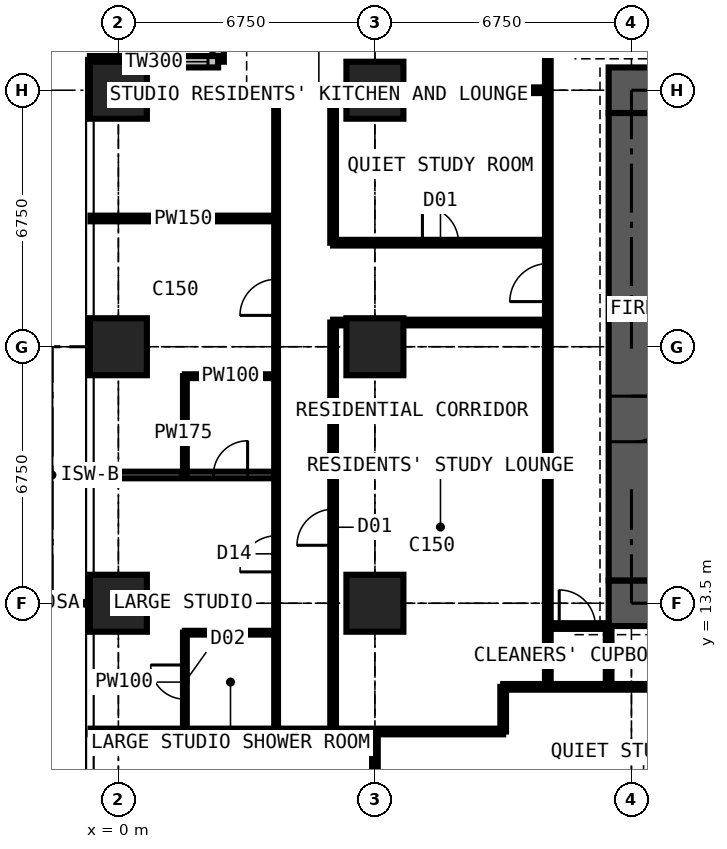
"""IFC4 building model, lengths in metres.
Left out: names, types, materials, properties, quantities, classifications, styles, units other than length and angle.
Written with IfcOpenShell. Run it as: python <this file> out.ifc"""

import sys

from ifc_helpers import new_model, si_unit, direction, frame, frame_2d, origin, origin_2d, place, context, subcontext, project, spatial, rectangle, extrude, element, fill, save


model = new_model("IFC4")
c1 = context("Model", 3, precision=1e-05, world=origin(), true_north=direction((0.0, 1.0)))
c2 = subcontext(c1, "Body", "Model", "MODEL_VIEW")
j1 = project(units=[si_unit("LENGTHUNIT", "METRE"), si_unit("PLANEANGLEUNIT", "RADIAN")], contexts=[c1])
p1 = place(None, origin())
s1 = spatial("IfcSite", under=j1, at=p1, CompositionType="ELEMENT")
p2 = place(p1, origin())
s2 = spatial("IfcBuilding", under=s1, at=p2, CompositionType="ELEMENT")
p3 = place(p2, frame((0.0, 0.0, 112.5)))
s3 = spatial("IfcBuildingStorey", under=s2, at=p3, CompositionType="ELEMENT", Elevation=112.5)
for number, where, z_axis, x_axis in (
    (1, (0.0, 13.5, 0.0), (0.0, 0.0, 1.0), (1.0, 0.0, 0.0)),
    (2, (0.0, 20.25, 0.0), (0.0, 0.0, 1.0), (1.0, 0.0, 0.0)),
    (3, (0.0, 27.0, 0.0), (0.0, 0.0, 1.0), (1.0, 0.0, 0.0)),
    (4, (6.75, 13.5, 0.0), (0.0, 0.0, 1.0), (1.0, 0.0, 0.0)),
    (5, (6.75, 20.25, 0.0), (0.0, 0.0, 1.0), (1.0, 0.0, 0.0)),
    (6, (6.75, 27.0, 0.0), (0.0, 0.0, 1.0), (1.0, 0.0, 0.0)),
):
    element("IfcColumn", number, at=place(p3, frame(where, z_axis=z_axis, x_axis=x_axis)), inside=s3, PredefinedType="COLUMN", context=c2, shape_type="SweptSolid", body=[
        extrude(rectangle(XDim=1.5, YDim=1.5, at=origin_2d()), origin(), (0.0, 0.0, 1.0), 3.6),
    ])
p4 = place(p3, frame((12.9, 13.5, 0.0), z_axis=(0.0, 0.0, 1.0), x_axis=(1.0, 0.0, 0.0)))
e7 = element("IfcWall", 7, at=p4, inside=s3, PredefinedType="SHEAR", context=c2, shape_type="SweptSolid", body=[
    extrude(rectangle(XDim=14.7, YDim=1.2, at=frame_2d((7.35, 0.0))), origin(), (0.0, 0.0, 1.0), 3.6),
])
p5 = place(p3, frame((27.6, 27.0, 0.0), z_axis=(0.0, 0.0, 1.0), x_axis=(-1.0, 0.0, 0.0)))
e8 = element("IfcWall", 8, at=p5, inside=s3, PredefinedType="SHEAR", context=c2, shape_type="SweptSolid", body=[
    extrude(rectangle(XDim=14.7, YDim=1.2, at=frame_2d((7.35, 0.0))), origin(), (0.0, 0.0, 1.0), 3.6),
])
p6 = place(p5, frame((5.225, 0.0, 0.0)))
e9 = element("IfcOpeningElement", 9, at=p6, cuts=e8, PredefinedType="OPENING", context=c2, shape_type="SweptSolid", body=[
    extrude(rectangle(XDim=0.9, YDim=2.2, at=frame_2d((0.45, 1.1))), frame((0.0, 0.61, 0.0), z_axis=(0.0, -1.0, 0.0), x_axis=(1.0, 0.0, 0.0)), (0.0, 0.0, 1.0), 1.22),
])
p7 = place(p5, frame((8.2, 0.0, 0.0)))
e10 = element("IfcOpeningElement", 10, at=p7, cuts=e8, PredefinedType="OPENING", context=c2, shape_type="SweptSolid", body=[
    extrude(rectangle(XDim=1.0, YDim=2.2, at=frame_2d((0.5, 1.1))), frame((0.0, 0.61, 0.0), z_axis=(0.0, -1.0, 0.0), x_axis=(1.0, 0.0, 0.0)), (0.0, 0.0, 1.0), 1.22),
])
p8 = place(p3, frame((13.5, 26.4, 0.0), z_axis=(0.0, 0.0, 1.0), x_axis=(0.0, -1.0, 0.0)))
e11 = element("IfcWall", 11, at=p8, inside=s3, PredefinedType="SHEAR", context=c2, shape_type="SweptSolid", body=[
    extrude(rectangle(XDim=12.3, YDim=1.2, at=frame_2d((6.15, 0.0))), origin(), (0.0, 0.0, 1.0), 3.6),
])
p9 = place(p8, frame((7.45, 0.0, 0.0)))
e12 = element("IfcOpeningElement", 12, at=p9, cuts=e11, PredefinedType="OPENING", context=c2, shape_type="SweptSolid", body=[
    extrude(rectangle(XDim=1.2, YDim=2.2, at=frame_2d((0.6, 1.1))), frame((0.0, 0.61, 0.0), z_axis=(0.0, -1.0, 0.0), x_axis=(1.0, 0.0, 0.0)), (0.0, 0.0, 1.0), 1.22),
])
p10 = place(p3, frame((2.625, 31.125, 0.0), z_axis=(0.0, 0.0, 1.0), x_axis=(0.0, -1.0, 0.0)))
e13 = element("IfcWall", 13, at=p10, inside=s3, PredefinedType="SOLIDWALL", context=c2, shape_type="SweptSolid", body=[
    extrude(rectangle(XDim=3.375, YDim=0.3, at=frame_2d((1.688, 0.0))), origin(), (0.0, 0.0, 1.0), 3.375),
])
p11 = place(p10, frame((0.788, 0.0, 0.6)))
e14 = element("IfcOpeningElement", 14, at=p11, cuts=e13, PredefinedType="OPENING", context=c2, shape_type="SweptSolid", body=[
    extrude(rectangle(XDim=1.8, YDim=2.1, at=frame_2d((0.9, 1.05))), frame((0.0, 0.16, 0.0), z_axis=(0.0, -1.0, 0.0), x_axis=(1.0, 0.0, 0.0)), (0.0, 0.0, 1.0), 0.32),
])
p12 = place(p3, frame((2.625, 27.75, 0.0), z_axis=(0.0, 0.0, 1.0), x_axis=(-1.0, 0.0, 0.0)))
e15 = element("IfcWall", 15, at=p12, inside=s3, PredefinedType="SOLIDWALL", context=c2, shape_type="SweptSolid", body=[
    extrude(rectangle(XDim=3.375, YDim=0.3, at=frame_2d((1.688, 0.0))), origin(), (0.0, 0.0, 1.0), 3.375),
])
p13 = place(p12, frame((0.268, 0.0, 0.9)))
e16 = element("IfcOpeningElement", 16, at=p13, cuts=e15, PredefinedType="OPENING", context=c2, shape_type="SweptSolid", body=[
    extrude(rectangle(XDim=1.5, YDim=1.8, at=frame_2d((0.75, 0.9))), frame((0.0, 0.16, 0.0), z_axis=(0.0, -1.0, 0.0), x_axis=(1.0, 0.0, 0.0)), (0.0, 0.0, 1.0), 0.32),
])
p14 = place(p3, frame((-0.734, 10.125, 0.0), z_axis=(0.0, 0.0, 1.0), x_axis=(1.0, 0.0, 0.0)))
e17 = element("IfcWall", 17, at=p14, inside=s3, PredefinedType="PARTITIONING", context=c2, shape_type="SweptSolid", body=[
    extrude(rectangle(XDim=10.859, YDim=0.15, at=frame_2d((5.429, 0.0))), origin(), (0.0, 0.0, 1.0), 3.375),
])
p15 = place(p3, frame((-0.734, 16.875, 0.0), z_axis=(0.0, 0.0, 1.0), x_axis=(1.0, 0.0, 0.0)))
e18 = element("IfcWall", 18, at=p15, inside=s3, PredefinedType="PARTITIONING", context=c2, shape_type="SweptSolid", body=[
    extrude(rectangle(XDim=4.884, YDim=0.175, at=frame_2d((2.442, 0.0))), origin(), (0.0, 0.0, 1.0), 3.375),
])
p16 = place(p15, frame((3.234, 0.0, 0.0)))
e19 = element("IfcOpeningElement", 19, at=p16, cuts=e18, PredefinedType="OPENING", context=c2, shape_type="SweptSolid", body=[
    extrude(rectangle(XDim=0.9, YDim=2.2, at=frame_2d((0.45, 1.1))), frame((0.0, 0.097, 0.0), z_axis=(0.0, -1.0, 0.0), x_axis=(1.0, 0.0, 0.0)), (0.0, 0.0, 1.0), 0.195),
])
p17 = place(p3, frame((-0.734, 23.625, 0.0), z_axis=(0.0, 0.0, 1.0), x_axis=(1.0, 0.0, 0.0)))
e20 = element("IfcWall", 20, at=p17, inside=s3, PredefinedType="PARTITIONING", context=c2, shape_type="SweptSolid", body=[
    extrude(rectangle(XDim=4.884, YDim=0.15, at=frame_2d((2.442, 0.0))), origin(), (0.0, 0.0, 1.0), 3.375),
])
p18 = place(p3, frame((1.75, 10.125, 0.0), z_axis=(0.0, 0.0, 1.0), x_axis=(0.0, 1.0, 0.0)))
e21 = element("IfcWall", 21, at=p18, inside=s3, PredefinedType="PARTITIONING", context=c2, shape_type="SweptSolid", body=[
    extrude(rectangle(XDim=2.6, YDim=0.1, at=frame_2d((1.3, 0.0))), origin(), (0.0, 0.0, 1.0), 3.375),
])
p19 = place(p18, frame((0.85, 0.0, 0.0)))
e22 = element("IfcOpeningElement", 22, at=p19, cuts=e21, PredefinedType="OPENING", context=c2, shape_type="SweptSolid", body=[
    extrude(rectangle(XDim=0.9, YDim=2.2, at=frame_2d((0.45, 1.1))), frame((0.0, 0.06, 0.0), z_axis=(0.0, -1.0, 0.0), x_axis=(1.0, 0.0, 0.0)), (0.0, 0.0, 1.0), 0.12),
])
p20 = place(p3, frame((1.75, 12.725, 0.0), z_axis=(0.0, 0.0, 1.0), x_axis=(1.0, 0.0, 0.0)))
e23 = element("IfcWall", 23, at=p20, inside=s3, PredefinedType="PARTITIONING", context=c2, shape_type="SweptSolid", body=[
    extrude(rectangle(XDim=2.4, YDim=0.1, at=frame_2d((1.2, 0.0))), origin(), (0.0, 0.0, 1.0), 3.375),
])
p21 = place(p3, frame((1.75, 16.875, 0.0), z_axis=(0.0, 0.0, 1.0), x_axis=(0.0, 1.0, 0.0)))
e24 = element("IfcWall", 24, at=p21, inside=s3, PredefinedType="PARTITIONING", context=c2, shape_type="SweptSolid", body=[
    extrude(rectangle(XDim=2.6, YDim=0.1, at=frame_2d((1.3, 0.0))), origin(), (0.0, 0.0, 1.0), 3.375),
])
p22 = place(p3, frame((1.75, 19.475, 0.0), z_axis=(0.0, 0.0, 1.0), x_axis=(1.0, 0.0, 0.0)))
e25 = element("IfcWall", 25, at=p22, inside=s3, PredefinedType="PARTITIONING", context=c2, shape_type="SweptSolid", body=[
    extrude(rectangle(XDim=2.4, YDim=0.1, at=frame_2d((1.2, 0.0))), origin(), (0.0, 0.0, 1.0), 3.375),
])
p23 = place(p3, frame((4.15, 10.125, 0.0), z_axis=(0.0, 0.0, 1.0), x_axis=(0.0, 1.0, 0.0)))
e26 = element("IfcWall", 26, at=p23, inside=s3, PredefinedType="PARTITIONING", context=c2, shape_type="SweptSolid", body=[
    extrude(rectangle(XDim=16.875, YDim=0.1, at=frame_2d((8.438, 0.0))), origin(), (0.0, 0.0, 1.0), 3.375),
])
p24 = place(p23, frame((4.2, 0.0, 0.0)))
e27 = element("IfcOpeningElement", 27, at=p24, cuts=e26, PredefinedType="OPENING", context=c2, shape_type="SweptSolid", body=[
    extrude(rectangle(XDim=0.95, YDim=2.2, at=frame_2d((0.475, 1.1))), frame((0.0, 0.06, 0.0), z_axis=(0.0, -1.0, 0.0), x_axis=(1.0, 0.0, 0.0)), (0.0, 0.0, 1.0), 0.12),
])
p25 = place(p23, frame((10.95, 0.0, 0.0)))
e28 = element("IfcOpeningElement", 28, at=p25, cuts=e26, PredefinedType="OPENING", context=c2, shape_type="SweptSolid", body=[
    extrude(rectangle(XDim=0.95, YDim=2.2, at=frame_2d((0.475, 1.1))), frame((0.0, 0.06, 0.0), z_axis=(0.0, -1.0, 0.0), x_axis=(1.0, 0.0, 0.0)), (0.0, 0.0, 1.0), 0.12),
])
p26 = place(p3, frame((4.15, 27.0, 0.0), z_axis=(0.0, 0.0, 1.0), x_axis=(1.0, 0.0, 0.0)))
e29 = element("IfcWall", 29, at=p26, inside=s3, PredefinedType="PARTITIONING", context=c2, shape_type="SweptSolid", body=[
    extrude(rectangle(XDim=7.15, YDim=0.15, at=frame_2d((3.575, 0.0))), origin(), (0.0, 0.0, 1.0), 2.806),
])
p27 = place(p3, frame((5.65, 10.125, 0.0), z_axis=(0.0, 0.0, 1.0), x_axis=(0.0, 1.0, 0.0)))
e30 = element("IfcWall", 30, at=p27, inside=s3, PredefinedType="PARTITIONING", context=c2, shape_type="SweptSolid", body=[
    extrude(rectangle(XDim=10.762, YDim=0.15, at=frame_2d((5.381, 0.0))), origin(), (0.0, 0.0, 1.0), 3.375),
])
p28 = place(p27, frame((4.9, 0.0, 0.0)))
e31 = element("IfcOpeningElement", 31, at=p28, cuts=e30, PredefinedType="OPENING", context=c2, shape_type="SweptSolid", body=[
    extrude(rectangle(XDim=0.95, YDim=2.2, at=frame_2d((0.475, 1.1))), frame((0.0, 0.085, 0.0), z_axis=(0.0, -1.0, 0.0), x_axis=(1.0, 0.0, 0.0)), (0.0, 0.0, 1.0), 0.17),
])
p29 = place(p3, frame((5.65, 20.887, 0.0), z_axis=(0.0, 0.0, 1.0), x_axis=(1.0, 0.0, 0.0)))
e32 = element("IfcWall", 32, at=p29, inside=s3, PredefinedType="PARTITIONING", context=c2, shape_type="SweptSolid", body=[
    extrude(rectangle(XDim=5.65, YDim=0.15, at=frame_2d((2.825, 0.0))), origin(), (0.0, 0.0, 1.0), 3.375),
])
p30 = place(p3, frame((5.65, 22.988, 0.0), z_axis=(0.0, 0.0, 1.0), x_axis=(0.0, 1.0, 0.0)))
e33 = element("IfcWall", 33, at=p30, inside=s3, PredefinedType="PARTITIONING", context=c2, shape_type="SweptSolid", body=[
    extrude(rectangle(XDim=4.012, YDim=0.15, at=frame_2d((2.006, 0.0))), origin(), (0.0, 0.0, 1.0), 3.375),
])
p31 = place(p3, frame((5.65, 22.988, 0.0), z_axis=(0.0, 0.0, 1.0), x_axis=(1.0, 0.0, 0.0)))
e34 = element("IfcWall", 34, at=p31, inside=s3, PredefinedType="PARTITIONING", context=c2, shape_type="SweptSolid", body=[
    extrude(rectangle(XDim=5.65, YDim=0.15, at=frame_2d((2.825, 0.0))), origin(), (0.0, 0.0, 1.0), 3.375),
])
p32 = place(p31, frame((2.35, 0.0, 0.0)))
e35 = element("IfcOpeningElement", 35, at=p32, cuts=e34, PredefinedType="OPENING", context=c2, shape_type="SweptSolid", body=[
    extrude(rectangle(XDim=0.95, YDim=2.2, at=frame_2d((0.475, 1.1))), frame((0.0, 0.085, 0.0), z_axis=(0.0, -1.0, 0.0), x_axis=(1.0, 0.0, 0.0)), (0.0, 0.0, 1.0), 0.17),
])
p33 = place(p3, frame((6.75, 4.15, 0.0), z_axis=(0.0, 0.0, 1.0), x_axis=(0.0, 1.0, 0.0)))
e36 = element("IfcWall", 36, at=p33, inside=s3, PredefinedType="PARTITIONING", context=c2, shape_type="SweptSolid", body=[
    extrude(rectangle(XDim=5.975, YDim=0.15, at=frame_2d((2.988, 0.0))), origin(), (0.0, 0.0, 1.0), 2.877),
])
p34 = place(p3, frame((10.125, 10.125, 0.0), z_axis=(0.0, 0.0, 1.0), x_axis=(0.0, 1.0, 0.0)))
e37 = element("IfcWall", 37, at=p34, inside=s3, PredefinedType="PARTITIONING", context=c2, shape_type="SweptSolid", body=[
    extrude(rectangle(XDim=1.175, YDim=0.15, at=frame_2d((0.587, 0.0))), origin(), (0.0, 0.0, 1.0), 3.375),
])
p35 = place(p3, frame((10.125, 11.3, 0.0), z_axis=(0.0, 0.0, 1.0), x_axis=(1.0, 0.0, 0.0)))
e38 = element("IfcWall", 38, at=p35, inside=s3, PredefinedType="PARTITIONING", context=c2, shape_type="SweptSolid", body=[
    extrude(rectangle(XDim=20.675, YDim=0.15, at=frame_2d((10.337, 0.0))), origin(), (0.0, 0.0, 1.0), 3.375),
])
p36 = place(p35, frame((11.312, 0.0, 0.0)))
e39 = element("IfcOpeningElement", 39, at=p36, cuts=e38, PredefinedType="OPENING", context=c2, shape_type="SweptSolid", body=[
    extrude(rectangle(XDim=1.0, YDim=2.2, at=frame_2d((0.5, 1.1))), frame((0.0, 0.085, 0.0), z_axis=(0.0, -1.0, 0.0), x_axis=(1.0, 0.0, 0.0)), (0.0, 0.0, 1.0), 0.17),
])
p37 = place(p3, frame((11.3, 11.3, 0.0), z_axis=(0.0, 0.0, 1.0), x_axis=(0.0, 1.0, 0.0)))
e40 = element("IfcWall", 40, at=p37, inside=s3, PredefinedType="PARTITIONING", context=c2, shape_type="SweptSolid", body=[
    extrude(rectangle(XDim=19.3, YDim=0.15, at=frame_2d((9.65, 0.0))), origin(), (0.0, 0.0, 1.0), 3.375),
])
p38 = place(p37, frame((18.1, 0.0, 0.0)))
e41 = element("IfcOpeningElement", 41, at=p38, cuts=e40, PredefinedType="OPENING", context=c2, shape_type="SweptSolid", body=[
    extrude(rectangle(XDim=1.0, YDim=2.2, at=frame_2d((0.5, 1.1))), frame((0.0, 0.085, 0.0), z_axis=(0.0, -1.0, 0.0), x_axis=(1.0, 0.0, 0.0)), (0.0, 0.0, 1.0), 0.17),
])
p39 = place(p37, frame((10.137, 0.0, 0.0)))
e42 = element("IfcOpeningElement", 42, at=p39, cuts=e40, PredefinedType="OPENING", context=c2, shape_type="SweptSolid", body=[
    extrude(rectangle(XDim=1.0, YDim=2.2, at=frame_2d((0.5, 1.1))), frame((0.0, 0.085, 0.0), z_axis=(0.0, -1.0, 0.0), x_axis=(1.0, 0.0, 0.0)), (0.0, 0.0, 1.0), 0.17),
])
p40 = place(p3, frame((11.3, 12.9, 0.0), z_axis=(0.0, 0.0, 1.0), x_axis=(1.0, 0.0, 0.0)))
e43 = element("IfcWall", 43, at=p40, inside=s3, PredefinedType="PARTITIONING", context=c2, shape_type="SweptSolid", body=[
    extrude(rectangle(XDim=1.6, YDim=0.15, at=frame_2d((0.8, 0.0))), origin(), (0.0, 0.0, 1.0), 2.806),
])
p41 = place(p40, frame((0.3, 0.0, 0.0)))
e44 = element("IfcOpeningElement", 44, at=p41, cuts=e43, PredefinedType="OPENING", context=c2, shape_type="SweptSolid", body=[
    extrude(rectangle(XDim=0.95, YDim=2.2, at=frame_2d((0.475, 1.1))), frame((0.0, 0.085, 0.0), z_axis=(0.0, -1.0, 0.0), x_axis=(1.0, 0.0, 0.0)), (0.0, 0.0, 1.0), 0.17),
])
p42 = place(p3, frame((12.9, 11.3, 0.0), z_axis=(0.0, 0.0, 1.0), x_axis=(0.0, 1.0, 0.0)))
e45 = element("IfcWall", 45, at=p42, inside=s3, PredefinedType="PARTITIONING", context=c2, shape_type="SweptSolid", body=[
    extrude(rectangle(XDim=1.6, YDim=0.15, at=frame_2d((0.8, 0.0))), origin(), (0.0, 0.0, 1.0), 3.375),
])
p43 = place(p13, origin())
e46 = element("IfcWindow", 46, at=p43, inside=s3, PartitioningType="SINGLE_PANEL", PredefinedType="WINDOW", context=c2, shape_type="SweptSolid", body=[
    extrude(rectangle(XDim=1.5, YDim=1.8, at=frame_2d((0.75, 0.9))), frame((0.0, 0.03, 0.0), z_axis=(0.0, -1.0, 0.0), x_axis=(1.0, 0.0, 0.0)), (0.0, 0.0, 1.0), 0.06),
])
fill(e16, e46)
p44 = place(p9, origin())
e47 = element("IfcDoor", 47, at=p44, inside=s3, OperationType="DOUBLE_DOOR_SINGLE_SWING", PredefinedType="DOOR", context=c2, shape_type="SweptSolid", body=[
    extrude(rectangle(XDim=1.2, YDim=2.2, at=frame_2d((0.6, 1.1))), frame((0.0, 0.025, 0.0), z_axis=(0.0, -1.0, 0.0), x_axis=(1.0, 0.0, 0.0)), (0.0, 0.0, 1.0), 0.05),
])
fill(e12, e47)
p45 = place(p41, origin())
e48 = element("IfcDoor", 48, at=p45, inside=s3, OperationType="SINGLE_SWING_LEFT", PredefinedType="DOOR", context=c2, shape_type="SweptSolid", body=[
    extrude(rectangle(XDim=0.95, YDim=2.2, at=frame_2d((0.475, 1.1))), frame((0.0, 0.025, 0.0), z_axis=(0.0, -1.0, 0.0), x_axis=(1.0, 0.0, 0.0)), (0.0, 0.0, 1.0), 0.05),
])
fill(e44, e48)
p46 = place(p24, origin())
e49 = element("IfcDoor", 49, at=p46, inside=s3, OperationType="SINGLE_SWING_LEFT", PredefinedType="DOOR", context=c2, shape_type="SweptSolid", body=[
    extrude(rectangle(XDim=0.95, YDim=2.2, at=frame_2d((0.475, 1.1))), frame((0.0, 0.025, 0.0), z_axis=(0.0, -1.0, 0.0), x_axis=(1.0, 0.0, 0.0)), (0.0, 0.0, 1.0), 0.05),
])
fill(e27, e49)
p47 = place(p19, origin())
e50 = element("IfcDoor", 50, at=p47, inside=s3, OperationType="SINGLE_SWING_RIGHT", PredefinedType="DOOR", context=c2, shape_type="SweptSolid", body=[
    extrude(rectangle(XDim=0.9, YDim=2.2, at=frame_2d((0.45, 1.1))), frame((0.0, 0.025, 0.0), z_axis=(0.0, -1.0, 0.0), x_axis=(1.0, 0.0, 0.0)), (0.0, 0.0, 1.0), 0.05),
])
fill(e22, e50)
p48 = place(p25, origin())
e51 = element("IfcDoor", 51, at=p48, inside=s3, OperationType="SINGLE_SWING_LEFT", PredefinedType="DOOR", context=c2, shape_type="SweptSolid", body=[
    extrude(rectangle(XDim=0.95, YDim=2.2, at=frame_2d((0.475, 1.1))), frame((0.0, 0.025, 0.0), z_axis=(0.0, -1.0, 0.0), x_axis=(1.0, 0.0, 0.0)), (0.0, 0.0, 1.0), 0.05),
])
fill(e28, e51)
p49 = place(p16, origin())
e52 = element("IfcDoor", 52, at=p49, inside=s3, OperationType="SINGLE_SWING_RIGHT", PredefinedType="DOOR", context=c2, shape_type="SweptSolid", body=[
    extrude(rectangle(XDim=0.9, YDim=2.2, at=frame_2d((0.45, 1.1))), frame((0.0, 0.025, 0.0), z_axis=(0.0, -1.0, 0.0), x_axis=(1.0, 0.0, 0.0)), (0.0, 0.0, 1.0), 0.05),
])
fill(e19, e52)
p50 = place(p39, origin())
e53 = element("IfcDoor", 53, at=p50, inside=s3, OperationType="SINGLE_SWING_LEFT", PredefinedType="DOOR", context=c2, shape_type="SweptSolid", body=[
    extrude(rectangle(XDim=1.0, YDim=2.2, at=frame_2d((0.5, 1.1))), frame((0.0, 0.025, 0.0), z_axis=(0.0, -1.0, 0.0), x_axis=(1.0, 0.0, 0.0)), (0.0, 0.0, 1.0), 0.05),
])
fill(e42, e53)
p51 = place(p28, origin())
e54 = element("IfcDoor", 54, at=p51, inside=s3, OperationType="SINGLE_SWING_LEFT", PredefinedType="DOOR", context=c2, shape_type="SweptSolid", body=[
    extrude(rectangle(XDim=0.95, YDim=2.2, at=frame_2d((0.475, 1.1))), frame((0.0, 0.025, 0.0), z_axis=(0.0, -1.0, 0.0), x_axis=(1.0, 0.0, 0.0)), (0.0, 0.0, 1.0), 0.05),
])
fill(e31, e54)
p52 = place(p32, origin())
e55 = element("IfcDoor", 55, at=p52, inside=s3, OperationType="SINGLE_SWING_LEFT", PredefinedType="DOOR", context=c2, shape_type="SweptSolid", body=[
    extrude(rectangle(XDim=0.95, YDim=2.2, at=frame_2d((0.475, 1.1))), frame((0.0, 0.025, 0.0), z_axis=(0.0, -1.0, 0.0), x_axis=(1.0, 0.0, 0.0)), (0.0, 0.0, 1.0), 0.05),
])
fill(e35, e55)
save(model, sys.argv[1])
